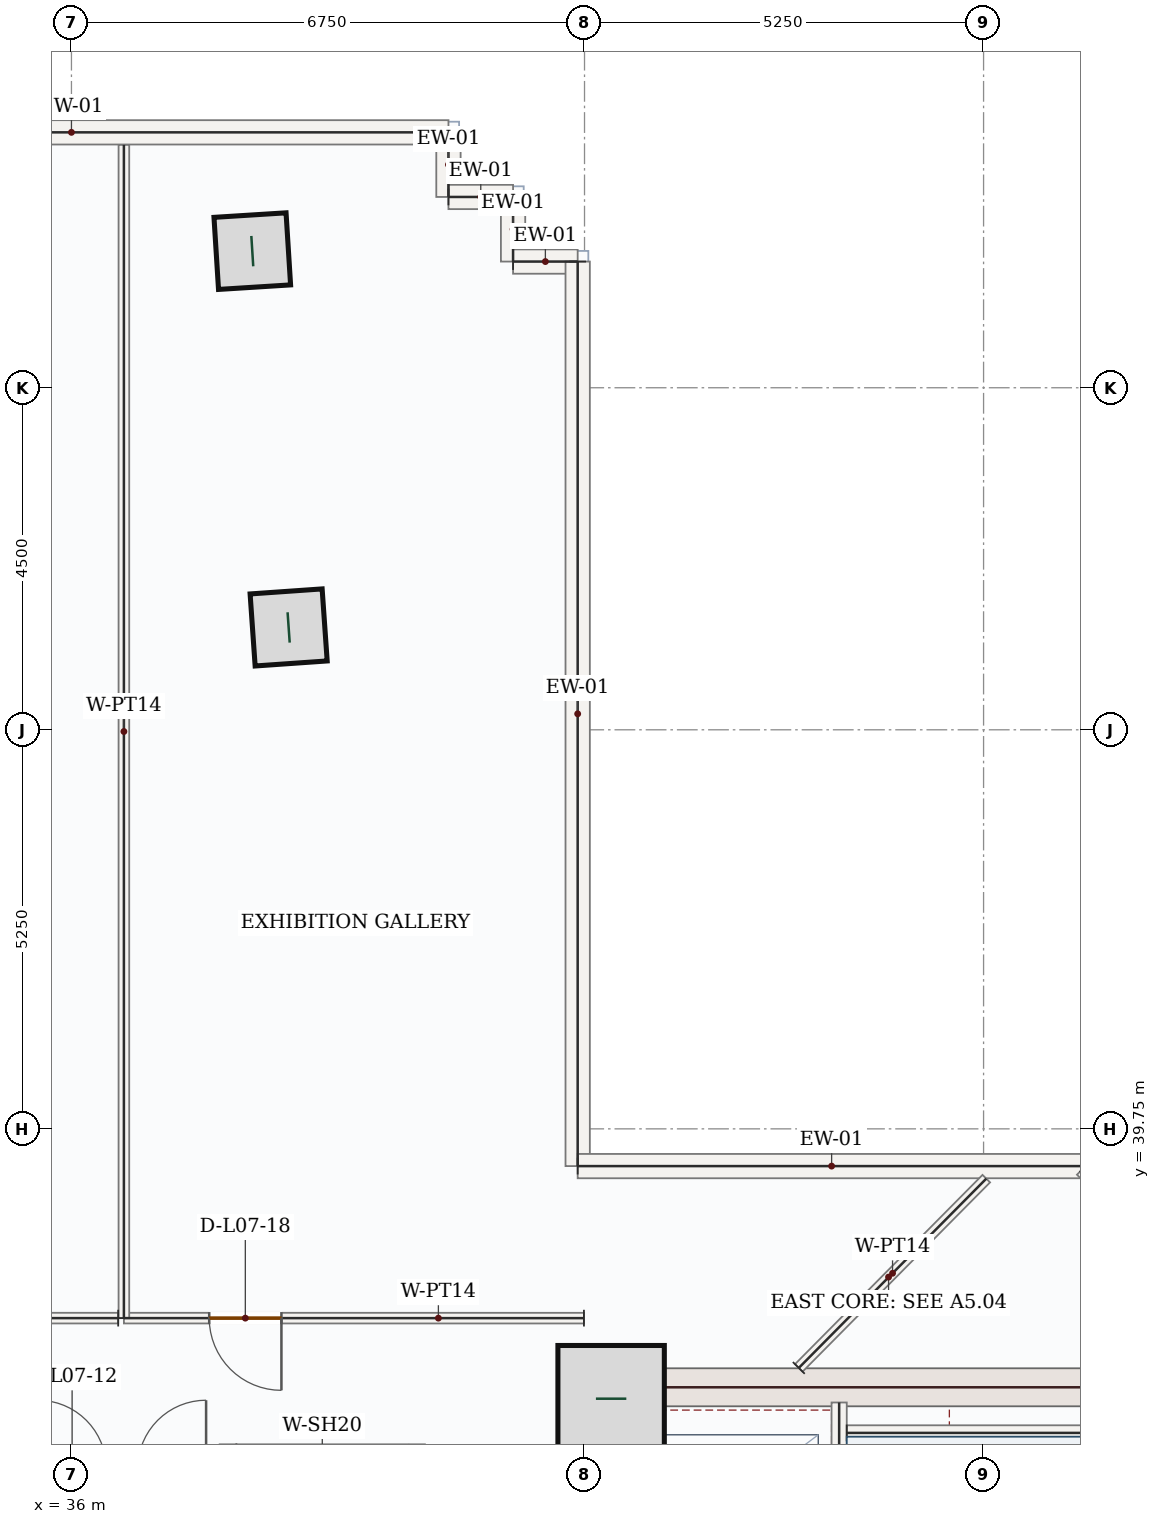
"""IFC4 building model, lengths in metres.
Left out: names, types, materials, properties, quantities, classifications, styles, units other than length and angle.
Written with IfcOpenShell. Run it as: python <this file> out.ifc"""

import sys

from ifc_helpers import new_model, si_unit, direction, frame, frame_2d, origin, origin_2d, place, context, subcontext, project, spatial, rectangle, hollow_rectangle, extrude, source, transform, mapped, element, fill, save


model = new_model("IFC4")
c1 = context("Model", 3, precision=1e-05, world=origin(), true_north=direction((0.0, 1.0)))
c2 = subcontext(c1, "Body", "Model", "MODEL_VIEW")
j1 = project(units=[si_unit("LENGTHUNIT", "METRE"), si_unit("PLANEANGLEUNIT", "RADIAN")], contexts=[c1])
p1 = place(None, origin())
s1 = spatial("IfcSite", under=j1, at=p1, CompositionType="ELEMENT")
p2 = place(p1, origin())
s2 = spatial("IfcBuilding", under=s1, at=p2, CompositionType="ELEMENT")
p3 = place(p2, frame((0.0, 0.0, 37.5)))
s3 = spatial("IfcBuildingStorey", under=s2, at=p3, CompositionType="ELEMENT", Elevation=37.5)
p4 = place(p3, frame((43.0, 28.05, 0.0), z_axis=(0.0, 0.0, 1.0), x_axis=(0.0, 1.0, 0.0)))
e1 = element("IfcWall", 1, at=p4, inside=s3, PredefinedType="SHEAR", context=c2, shape_type="SweptSolid", body=[
    extrude(rectangle(XDim=8.55, YDim=0.5, at=frame_2d((4.275, 0.0))), origin(), (0.0, 0.0, 1.0), 3.95),
])
p5 = place(p4, frame((1.5, 0.0, 0.0)))
e2 = element("IfcOpeningElement", 2, at=p5, cuts=e1, PredefinedType="OPENING", context=c2, shape_type="SweptSolid", body=[
    extrude(rectangle(XDim=1.1, YDim=2.2, at=frame_2d((0.55, 1.1))), frame((0.0, 0.26, 0.0), z_axis=(0.0, -1.0, 0.0), x_axis=(1.0, 0.0, 0.0)), (0.0, 0.0, 1.0), 0.52),
])
m1 = source(origin(), c2, "Body", "SweptSolid", [
    extrude(rectangle(XDim=7.0, YDim=0.5, at=frame_2d((3.5, 0.0))), origin(), (0.0, 0.0, 1.0), 3.95),
])
p6 = place(p3, frame((43.25, 36.35, 0.0), z_axis=(0.0, 0.0, 1.0), x_axis=(1.0, 0.0, 0.0)))
e3 = element("IfcWall", 3, at=p6, inside=s3, PredefinedType="SHEAR", context=c2, shape_type="MappedRepresentation", body=[
    mapped(m1, transform((0.0, 0.0, 0.0), x_axis=(1.0, 0.0, 0.0), y_axis=(0.0, 1.0, 0.0), z_axis=(0.0, 0.0, 1.0), scale=1.0)),
])
m2 = source(origin(), c2, "Body", "SweptSolid", [
    extrude(rectangle(XDim=1.4, YDim=1.4, at=origin_2d()), origin(), (0.0, 0.0, 1.0), 4.2),
])
p7 = place(p3, frame((43.1, 36.2, 0.0), z_axis=(0.0, 0.0, 1.0), x_axis=(1.0, 0.0, 0.0)))
e4 = element("IfcColumn", 4, at=p7, inside=s3, PredefinedType="COLUMN", context=c2, shape_type="MappedRepresentation", body=[
    mapped(m2, transform((0.0, 0.0, 0.0), x_axis=(1.0, 0.0, 0.0), y_axis=(0.0, 1.0, 0.0), z_axis=(0.0, 0.0, 1.0), scale=1.0)),
])
m3 = source(origin(), c2, "Body", "SweptSolid", [
    extrude(hollow_rectangle(XDim=0.95, YDim=0.95, WallThickness=0.05, at=origin_2d()), origin(), (0.0, 0.0, 1.0), 4.2),
])
for number, where, z_axis, x_axis in (
    (5, (38.857, 46.346, 0.0), (0.0, 0.0, 1.0), (-0.07, 0.998, 0.0)),
    (6, (38.379, 51.297, 0.0), (0.0, 0.0, 1.0), (-0.063, 0.998, 0.0)),
):
    element("IfcColumn", number, at=place(p3, frame(where, z_axis=z_axis, x_axis=x_axis)), inside=s3, PredefinedType="COLUMN", context=c2, shape_type="MappedRepresentation", body=[
        mapped(m3, transform((0.0, 0.0, 0.0), x_axis=(1.0, 0.0, 0.0), y_axis=(0.0, 1.0, 0.0), z_axis=(0.0, 0.0, 1.0), scale=1.0)),
    ])
m4 = source(origin(), c2, "Body", "SweptSolid", [
    extrude(rectangle(XDim=9.92, YDim=0.32, at=frame_2d((4.96, 0.0))), origin(), (0.0, 0.0, 1.0), 3.95),
])
p8 = place(p3, frame((31.04, 52.86, 0.0), z_axis=(0.0, 0.0, 1.0), x_axis=(1.0, 0.0, 0.0)))
e7 = element("IfcWall", 7, at=p8, inside=s3, PredefinedType="SOLIDWALL", context=c2, shape_type="MappedRepresentation", body=[
    mapped(m4, transform((0.0, 0.0, 0.0), x_axis=(1.0, 0.0, 0.0), y_axis=(0.0, 1.0, 0.0), z_axis=(0.0, 0.0, 1.0), scale=1.0)),
])
m5 = source(origin(), c2, "Body", "SweptSolid", [
    extrude(rectangle(XDim=0.85, YDim=0.32, at=frame_2d((0.425, 0.0))), origin(), (0.0, 0.0, 1.0), 3.95),
])
for number, where, z_axis, x_axis in (
    (8, (40.96, 52.86, 0.0), (0.0, 0.0, 1.0), (0.0, -1.0, 0.0)),
    (9, (40.96, 52.01, 0.0), (0.0, 0.0, 1.0), (1.0, 0.0, 0.0)),
    (10, (41.81, 52.01, 0.0), (0.0, 0.0, 1.0), (0.0, -1.0, 0.0)),
):
    element("IfcWall", number, at=place(p3, frame(where, z_axis=z_axis, x_axis=x_axis)), inside=s3, PredefinedType="SOLIDWALL", context=c2, shape_type="MappedRepresentation", body=[
        mapped(m5, transform((0.0, 0.0, 0.0), x_axis=(1.0, 0.0, 0.0), y_axis=(0.0, 1.0, 0.0), z_axis=(0.0, 0.0, 1.0), scale=1.0)),
    ])
m6 = source(origin(), c2, "Body", "SweptSolid", [
    extrude(rectangle(XDim=0.85, YDim=0.32, at=frame_2d((0.425, 0.0))), origin(), (0.0, 0.0, 1.0), 3.95),
])
p9 = place(p3, frame((41.81, 51.16, 0.0), z_axis=(0.0, 0.0, 1.0), x_axis=(1.0, 0.0, 0.0)))
e11 = element("IfcWall", 11, at=p9, inside=s3, PredefinedType="SOLIDWALL", context=c2, shape_type="MappedRepresentation", body=[
    mapped(m6, transform((0.0, 0.0, 0.0), x_axis=(1.0, 0.0, 0.0), y_axis=(0.0, 1.0, 0.0), z_axis=(0.0, 0.0, 1.0), scale=1.0)),
])
m7 = source(origin(), c2, "Body", "SweptSolid", [
    extrude(rectangle(XDim=11.9, YDim=0.32, at=frame_2d((5.95, 0.0))), origin(), (0.0, 0.0, 1.0), 3.95),
])
p10 = place(p3, frame((42.66, 51.16, 0.0), z_axis=(0.0, 0.0, 1.0), x_axis=(0.0, -1.0, 0.0)))
e12 = element("IfcWall", 12, at=p10, inside=s3, PredefinedType="SOLIDWALL", context=c2, shape_type="MappedRepresentation", body=[
    mapped(m7, transform((0.0, 0.0, 0.0), x_axis=(1.0, 0.0, 0.0), y_axis=(0.0, 1.0, 0.0), z_axis=(0.0, 0.0, 1.0), scale=1.0)),
])
m8 = source(origin(), c2, "Body", "SweptSolid", [
    extrude(rectangle(XDim=6.682, YDim=0.32, at=frame_2d((3.341, 0.0))), origin(), (0.0, 0.0, 1.0), 3.95),
])
p11 = place(p3, frame((42.66, 39.26, 0.0), z_axis=(0.0, 0.0, 1.0), x_axis=(1.0, 0.0, 0.0)))
e13 = element("IfcWall", 13, at=p11, inside=s3, PredefinedType="SOLIDWALL", context=c2, shape_type="MappedRepresentation", body=[
    mapped(m8, transform((0.0, 0.0, 0.0), x_axis=(1.0, 0.0, 0.0), y_axis=(0.0, 1.0, 0.0), z_axis=(0.0, 0.0, 1.0), scale=1.0)),
])
m9 = source(origin(), c2, "Body", "SweptSolid", [
    extrude(rectangle(XDim=5.258, YDim=0.32, at=frame_2d((2.629, 0.0))), origin(), (0.0, 0.0, 1.0), 3.95),
])
p12 = place(p3, frame((49.342, 39.26, 0.0), z_axis=(0.0, 0.0, 1.0), x_axis=(0.707106781187, -0.707106781187, 0.0)))
e14 = element("IfcWall", 14, at=p12, inside=s3, PredefinedType="SOLIDWALL", context=c2, shape_type="MappedRepresentation", body=[
    mapped(m9, transform((0.0, 0.0, 0.0), x_axis=(1.0, 0.0, 0.0), y_axis=(0.0, 1.0, 0.0), z_axis=(0.0, 0.0, 1.0), scale=1.0)),
])
p13 = place(p3, frame((46.1, 28.15, 0.0), z_axis=(0.0, 0.0, 1.0), x_axis=(0.0, 1.0, 0.0)))
e15 = element("IfcWall", 15, at=p13, inside=s3, PredefinedType="SOLIDWALL", context=c2, shape_type="SweptSolid", body=[
    extrude(rectangle(XDim=8.0, YDim=0.2, at=frame_2d((4.0, 0.0))), origin(), (0.0, 0.0, 1.0), 3.95),
])
p14 = place(p13, frame((0.4, 0.0, 0.0)))
e16 = element("IfcOpeningElement", 16, at=p14, cuts=e15, PredefinedType="OPENING", context=c2, shape_type="SweptSolid", body=[
    extrude(rectangle(XDim=1.05, YDim=2.15, at=frame_2d((0.525, 1.075))), frame((0.0, 0.11, 0.0), z_axis=(0.0, -1.0, 0.0), x_axis=(1.0, 0.0, 0.0)), (0.0, 0.0, 1.0), 0.22),
])
m10 = source(origin(), c2, "Body", "SweptSolid", [
    extrude(rectangle(XDim=3.25, YDim=0.2, at=frame_2d((1.625, 0.0))), origin(), (0.0, 0.0, 1.0), 3.95),
])
p15 = place(p3, frame((46.2, 35.75, 0.0), z_axis=(0.0, 0.0, 1.0), x_axis=(1.0, 0.0, 0.0)))
e17 = element("IfcWall", 17, at=p15, inside=s3, PredefinedType="SOLIDWALL", context=c2, shape_type="MappedRepresentation", body=[
    mapped(m10, transform((0.0, 0.0, 0.0), x_axis=(1.0, 0.0, 0.0), y_axis=(0.0, 1.0, 0.0), z_axis=(0.0, 0.0, 1.0), scale=1.0)),
])
m11 = source(origin(), c2, "Body", "SweptSolid", [
    extrude(rectangle(XDim=2.4, YDim=0.2, at=frame_2d((1.2, 0.0))), origin(), (0.0, 0.0, 1.0), 3.95),
])
for number, where, z_axis, x_axis in (
    (18, (38.05, 33.2, 0.0), (0.0, 0.0, 1.0), (0.0, 1.0, 0.0)),
    (19, (40.55, 33.2, 0.0), (0.0, 0.0, 1.0), (0.0, 1.0, 0.0)),
):
    element("IfcWall", number, at=place(p3, frame(where, z_axis=z_axis, x_axis=x_axis)), inside=s3, PredefinedType="SOLIDWALL", context=c2, shape_type="MappedRepresentation", body=[
        mapped(m11, transform((0.0, 0.0, 0.0), x_axis=(1.0, 0.0, 0.0), y_axis=(0.0, 1.0, 0.0), z_axis=(0.0, 0.0, 1.0), scale=1.0)),
    ])
m12 = source(origin(), c2, "Body", "SweptSolid", [
    extrude(rectangle(XDim=3.505, YDim=0.14, at=frame_2d((1.752, 0.0))), origin(), (0.0, 0.0, 1.0), 3.95),
])
p16 = place(p3, frame((45.569, 36.605, 0.0), z_axis=(0.0, 0.0, 1.0), x_axis=(0.703790445361, 0.710407635811, 0.0)))
e20 = element("IfcWall", 20, at=p16, inside=s3, PredefinedType="PARTITIONING", context=c2, shape_type="MappedRepresentation", body=[
    mapped(m12, transform((0.0, 0.0, 0.0), x_axis=(1.0, 0.0, 0.0), y_axis=(0.0, 1.0, 0.0), z_axis=(0.0, 0.0, 1.0), scale=1.0)),
])
p17 = place(p3, frame((42.742, 37.26, 0.0), z_axis=(0.0, 0.0, 1.0), x_axis=(-0.999999999186, 4.0337219e-05, 0.0)))
e21 = element("IfcWall", 21, at=p17, inside=s3, PredefinedType="PARTITIONING", context=c2, shape_type="SweptSolid", body=[
    extrude(rectangle(XDim=6.052, YDim=0.14, at=frame_2d((3.026, 0.0))), origin(), (0.0, 0.0, 1.0), 3.95),
])
p18 = place(p17, frame((3.98, 0.0, 0.0)))
e22 = element("IfcOpeningElement", 22, at=p18, cuts=e21, PredefinedType="OPENING", context=c2, shape_type="SweptSolid", body=[
    extrude(rectangle(XDim=0.95, YDim=2.15, at=frame_2d((0.475, 1.075))), frame((0.0, 0.08, 0.0), z_axis=(0.0, -1.0, 0.0), x_axis=(1.0, 0.0, 0.0)), (0.0, 0.0, 1.0), 0.16),
])
m13 = source(origin(), c2, "Body", "SweptSolid", [
    extrude(rectangle(XDim=15.435, YDim=0.14, at=frame_2d((7.718, 0.0))), origin(), (0.0, 0.0, 1.0), 3.95),
])
p19 = place(p3, frame((36.69, 37.26, 0.0), z_axis=(0.0, 0.0, 1.0), x_axis=(0.0, 1.0, 0.0)))
e23 = element("IfcWall", 23, at=p19, inside=s3, PredefinedType="PARTITIONING", context=c2, shape_type="MappedRepresentation", body=[
    mapped(m13, transform((0.0, 0.0, 0.0), x_axis=(1.0, 0.0, 0.0), y_axis=(0.0, 1.0, 0.0), z_axis=(0.0, 0.0, 1.0), scale=1.0)),
])
p20 = place(p3, frame((36.615, 37.26, 0.0), z_axis=(0.0, 0.0, 1.0), x_axis=(-0.999999999449, -3.3182904e-05, 0.0)))
e24 = element("IfcWall", 24, at=p20, inside=s3, PredefinedType="PARTITIONING", context=c2, shape_type="SweptSolid", body=[
    extrude(rectangle(XDim=7.357, YDim=0.14, at=frame_2d((3.679, 0.0))), origin(), (0.0, 0.0, 1.0), 3.95),
])
p21 = place(p20, frame((1.41, 0.0, 0.0)))
e25 = element("IfcOpeningElement", 25, at=p21, cuts=e24, PredefinedType="OPENING", context=c2, shape_type="SweptSolid", body=[
    extrude(rectangle(XDim=0.95, YDim=2.15, at=frame_2d((0.475, 1.075))), frame((0.0, 0.08, 0.0), z_axis=(0.0, -1.0, 0.0), x_axis=(1.0, 0.0, 0.0)), (0.0, 0.0, 1.0), 0.16),
])
m14 = source(origin(), c2, "Body", "SweptSolid", [
    extrude(rectangle(XDim=0.95, YDim=2.15, at=frame_2d((0.475, 1.075))), frame((0.0, 0.025, 0.0), z_axis=(0.0, -1.0, 0.0), x_axis=(1.0, 0.0, 0.0)), (0.0, 0.0, 1.0), 0.05),
])
p22 = place(p18, origin())
e26 = element("IfcDoor", 26, at=p22, inside=s3, OperationType="SINGLE_SWING_LEFT", PredefinedType="DOOR", context=c2, shape_type="MappedRepresentation", body=[
    mapped(m14, transform((0.0, 0.0, 0.0), x_axis=(1.0, 0.0, 0.0), y_axis=(0.0, 1.0, 0.0), z_axis=(0.0, 0.0, 1.0), scale=1.0)),
])
fill(e22, e26)
save(model, sys.argv[1])
